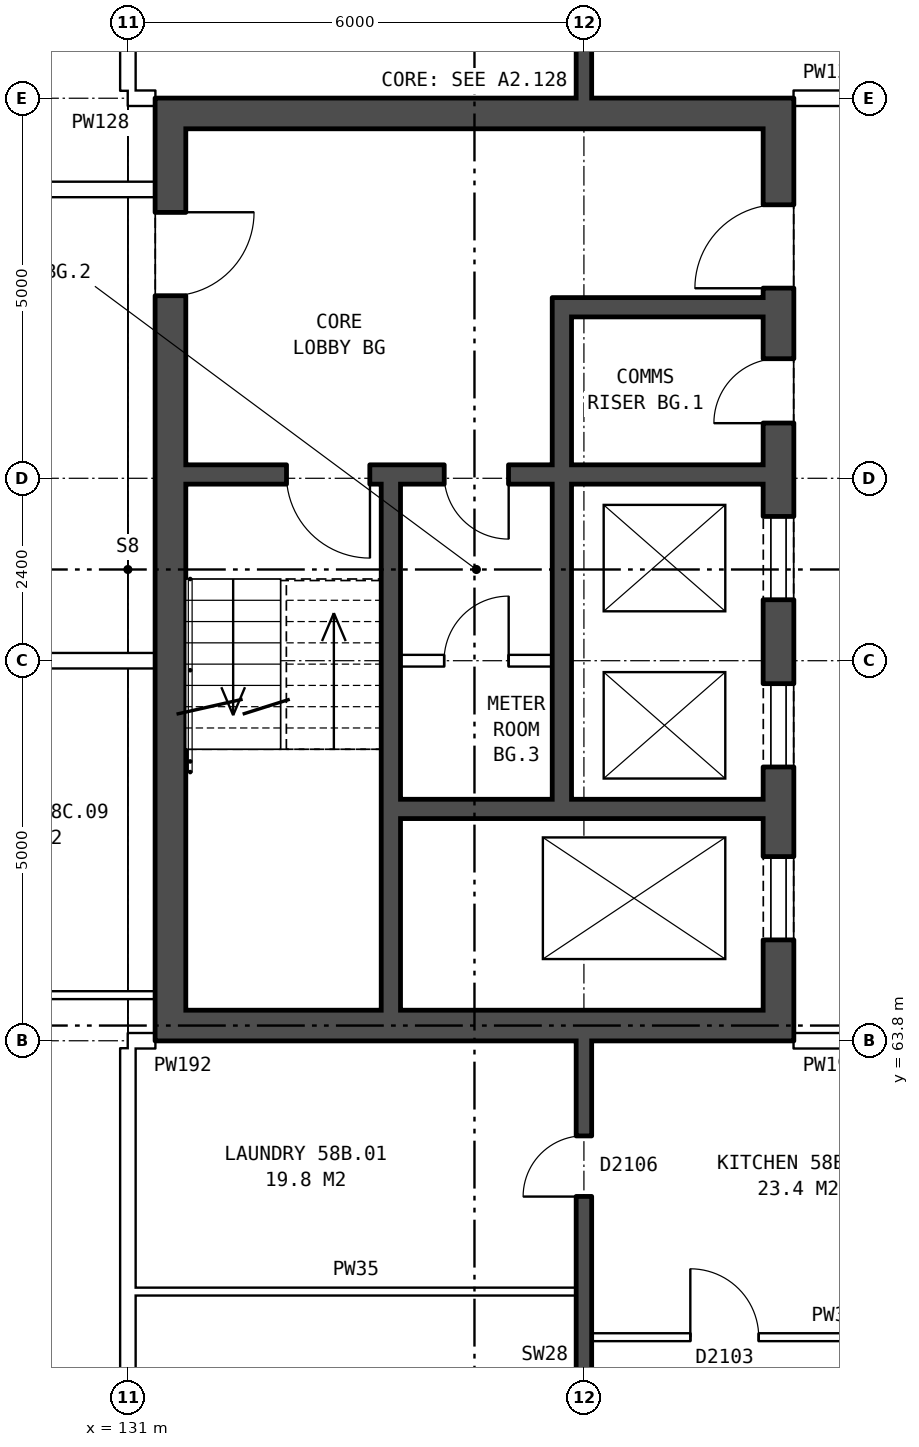
"""IFC4 building model, lengths in metres.
Left out: names, types, materials, properties, quantities, classifications, styles, units other than length and angle.
Written with IfcOpenShell. Run it as: python <this file> out.ifc"""

import sys

from ifc_helpers import new_model, si_unit, direction, frame, frame_2d, origin, place, context, subcontext, project, spatial, rectangle, extrude, element, fill, save


model = new_model("IFC4")
c1 = context("Model", 3, precision=1e-05, world=origin(), true_north=direction((0.0, 1.0)))
c2 = subcontext(c1, "Body", "Model", "MODEL_VIEW")
j1 = project(units=[si_unit("LENGTHUNIT", "METRE"), si_unit("PLANEANGLEUNIT", "RADIAN")], contexts=[c1])
p1 = place(None, origin())
s1 = spatial("IfcSite", under=j1, at=p1, CompositionType="ELEMENT")
p2 = place(p1, origin())
s2 = spatial("IfcBuilding", under=s1, at=p2, CompositionType="ELEMENT")
p3 = place(p2, frame((0.0, 0.0, 205.9)))
s3 = spatial("IfcBuildingStorey", under=s2, at=p3, CompositionType="ELEMENT", Elevation=205.9)
p4 = place(p3, frame((139.56, 63.8, 0.0), z_axis=(0.0, 0.0, 1.0), x_axis=(0.0, 1.0, 0.0)))
e1 = element("IfcWall", 1, at=p4, inside=s3, PredefinedType="SHEAR", context=c2, shape_type="SweptSolid", body=[
    extrude(rectangle(XDim=12.4, YDim=0.4, at=frame_2d((6.2, 0.0))), origin(), (0.0, 0.0, 1.0), 2.85),
])
p5 = place(p4, frame((1.325, 0.0, 0.0)))
e2 = element("IfcOpeningElement", 2, at=p5, cuts=e1, PredefinedType="OPENING", context=c2, shape_type="SweptSolid", body=[
    extrude(rectangle(XDim=1.1, YDim=2.1, at=frame_2d((0.55, 1.05))), frame((0.0, 0.21, 0.0), z_axis=(0.0, -1.0, 0.0), x_axis=(1.0, 0.0, 0.0)), (0.0, 0.0, 1.0), 0.42),
])
p6 = place(p4, frame((3.6, 0.0, 0.0)))
e3 = element("IfcOpeningElement", 3, at=p6, cuts=e1, PredefinedType="OPENING", context=c2, shape_type="SweptSolid", body=[
    extrude(rectangle(XDim=1.1, YDim=2.1, at=frame_2d((0.55, 1.05))), frame((0.0, 0.21, 0.0), z_axis=(0.0, -1.0, 0.0), x_axis=(1.0, 0.0, 0.0)), (0.0, 0.0, 1.0), 0.42),
])
p7 = place(p4, frame((5.8, 0.0, 0.0)))
e4 = element("IfcOpeningElement", 4, at=p7, cuts=e1, PredefinedType="OPENING", context=c2, shape_type="SweptSolid", body=[
    extrude(rectangle(XDim=1.1, YDim=2.1, at=frame_2d((0.55, 1.05))), frame((0.0, 0.21, 0.0), z_axis=(0.0, -1.0, 0.0), x_axis=(1.0, 0.0, 0.0)), (0.0, 0.0, 1.0), 0.42),
])
p8 = place(p4, frame((9.9, 0.0, 0.0)))
e5 = element("IfcOpeningElement", 5, at=p8, cuts=e1, PredefinedType="OPENING", context=c2, shape_type="SweptSolid", body=[
    extrude(rectangle(XDim=1.1, YDim=2.1, at=frame_2d((0.55, 1.05))), frame((0.0, 0.21, 0.0), z_axis=(0.0, -1.0, 0.0), x_axis=(1.0, 0.0, 0.0)), (0.0, 0.0, 1.0), 0.42),
])
p9 = place(p4, frame((8.125, 0.0, 0.0)))
e6 = element("IfcOpeningElement", 6, at=p9, cuts=e1, PredefinedType="OPENING", context=c2, shape_type="SweptSolid", body=[
    extrude(rectangle(XDim=0.85, YDim=2.1, at=frame_2d((0.425, 1.05))), frame((0.0, 0.21, 0.0), z_axis=(0.0, -1.0, 0.0), x_axis=(1.0, 0.0, 0.0)), (0.0, 0.0, 1.0), 0.42),
])
p10 = place(p3, frame((131.56, 63.8, 0.0), z_axis=(0.0, 0.0, 1.0), x_axis=(0.0, 1.0, 0.0)))
e7 = element("IfcWall", 7, at=p10, inside=s3, PredefinedType="SHEAR", context=c2, shape_type="SweptSolid", body=[
    extrude(rectangle(XDim=12.4, YDim=0.4, at=frame_2d((6.2, 0.0))), origin(), (0.0, 0.0, 1.0), 2.85),
])
p11 = place(p10, frame((9.8, 0.0, 0.0)))
e8 = element("IfcOpeningElement", 8, at=p11, cuts=e7, PredefinedType="OPENING", context=c2, shape_type="SweptSolid", body=[
    extrude(rectangle(XDim=1.1, YDim=2.1, at=frame_2d((0.55, 1.05))), frame((0.0, 0.21, 0.0), z_axis=(0.0, -1.0, 0.0), x_axis=(1.0, 0.0, 0.0)), (0.0, 0.0, 1.0), 0.42),
])
for number, where, z_axis, x_axis in (
    (9, (139.36, 64.0, 0.0), (0.0, 0.0, 1.0), (-1.0, 0.0, 0.0)),
    (10, (139.36, 76.0, 0.0), (0.0, 0.0, 1.0), (-1.0, 0.0, 0.0)),
):
    element("IfcWall", number, at=place(p3, frame(where, z_axis=z_axis, x_axis=x_axis)), inside=s3, PredefinedType="SHEAR", context=c2, shape_type="SweptSolid", body=[
        extrude(rectangle(XDim=7.6, YDim=0.4, at=frame_2d((3.8, 0.0))), origin(), (0.0, 0.0, 1.0), 2.85),
    ])
p12 = place(p3, frame((139.36, 66.85, 0.0), z_axis=(0.0, 0.0, 1.0), x_axis=(-1.0, 0.0, 0.0)))
e11 = element("IfcWall", 11, at=p12, inside=s3, PredefinedType="SHEAR", context=c2, shape_type="SweptSolid", body=[
    extrude(rectangle(XDim=4.775, YDim=0.25, at=frame_2d((2.388, 0.0))), origin(), (0.0, 0.0, 1.0), 2.85),
])
p13 = place(p3, frame((136.585, 68.8, 0.0), z_axis=(0.0, 0.0, 1.0), x_axis=(-1.0, 0.0, 0.0)))
e12 = element("IfcWall", 12, at=p13, inside=s3, PredefinedType="PARTITIONING", context=c2, shape_type="SweptSolid", body=[
    extrude(rectangle(XDim=2.0, YDim=0.15, at=frame_2d((1.0, 0.0))), origin(), (0.0, 0.0, 1.0), 2.85),
])
p14 = place(p13, frame((0.575, 0.0, 0.0)))
e13 = element("IfcOpeningElement", 13, at=p14, cuts=e12, PredefinedType="OPENING", context=c2, shape_type="SweptSolid", body=[
    extrude(rectangle(XDim=0.85, YDim=2.1, at=frame_2d((0.425, 1.05))), frame((0.0, 0.085, 0.0), z_axis=(0.0, -1.0, 0.0), x_axis=(1.0, 0.0, 0.0)), (0.0, 0.0, 1.0), 0.17),
])
p15 = place(p3, frame((139.36, 71.25, 0.0), z_axis=(0.0, 0.0, 1.0), x_axis=(-1.0, 0.0, 0.0)))
e14 = element("IfcWall", 14, at=p15, inside=s3, PredefinedType="SHEAR", context=c2, shape_type="SweptSolid", body=[
    extrude(rectangle(XDim=7.6, YDim=0.25, at=frame_2d((3.8, 0.0))), origin(), (0.0, 0.0, 1.0), 2.85),
])
p16 = place(p15, frame((5.175, 0.0, 0.0)))
e15 = element("IfcOpeningElement", 15, at=p16, cuts=e14, PredefinedType="OPENING", context=c2, shape_type="SweptSolid", body=[
    extrude(rectangle(XDim=1.1, YDim=2.1, at=frame_2d((0.55, 1.05))), frame((0.0, 0.135, 0.0), z_axis=(0.0, -1.0, 0.0), x_axis=(1.0, 0.0, 0.0)), (0.0, 0.0, 1.0), 0.27),
])
p17 = place(p15, frame((3.35, 0.0, 0.0)))
e16 = element("IfcOpeningElement", 16, at=p17, cuts=e14, PredefinedType="OPENING", context=c2, shape_type="SweptSolid", body=[
    extrude(rectangle(XDim=0.85, YDim=2.1, at=frame_2d((0.425, 1.05))), frame((0.0, 0.135, 0.0), z_axis=(0.0, -1.0, 0.0), x_axis=(1.0, 0.0, 0.0)), (0.0, 0.0, 1.0), 0.27),
])
p18 = place(p3, frame((139.36, 73.45, 0.0), z_axis=(0.0, 0.0, 1.0), x_axis=(-1.0, 0.0, 0.0)))
e17 = element("IfcWall", 17, at=p18, inside=s3, PredefinedType="SHEAR", context=c2, shape_type="SweptSolid", body=[
    extrude(rectangle(XDim=2.525, YDim=0.25, at=frame_2d((1.263, 0.0))), origin(), (0.0, 0.0, 1.0), 2.85),
])
p19 = place(p3, frame((136.71, 66.975, 0.0), z_axis=(0.0, 0.0, 1.0), x_axis=(0.0, 1.0, 0.0)))
e18 = element("IfcWall", 18, at=p19, inside=s3, PredefinedType="SHEAR", context=c2, shape_type="SweptSolid", body=[
    extrude(rectangle(XDim=4.15, YDim=0.25, at=frame_2d((2.075, 0.0))), origin(), (0.0, 0.0, 1.0), 2.85),
])
p20 = place(p3, frame((136.71, 71.375, 0.0), z_axis=(0.0, 0.0, 1.0), x_axis=(0.0, 1.0, 0.0)))
e19 = element("IfcWall", 19, at=p20, inside=s3, PredefinedType="SHEAR", context=c2, shape_type="SweptSolid", body=[
    extrude(rectangle(XDim=2.2, YDim=0.25, at=frame_2d((1.1, 0.0))), origin(), (0.0, 0.0, 1.0), 2.85),
])
p21 = place(p3, frame((134.46, 64.2, 0.0), z_axis=(0.0, 0.0, 1.0), x_axis=(0.0, 1.0, 0.0)))
e20 = element("IfcWall", 20, at=p21, inside=s3, PredefinedType="SHEAR", context=c2, shape_type="SweptSolid", body=[
    extrude(rectangle(XDim=6.925, YDim=0.25, at=frame_2d((3.462, 0.0))), origin(), (0.0, 0.0, 1.0), 2.85),
])
p22 = place(p3, frame((137.1, 59.9, 0.0), z_axis=(0.0, 0.0, 1.0), x_axis=(1.0, 0.0, 0.0)))
e21 = element("IfcWall", 21, at=p22, inside=s3, PredefinedType="PARTITIONING", context=c2, shape_type="SweptSolid", body=[
    extrude(rectangle(XDim=5.8, YDim=0.1, at=frame_2d((2.9, 0.0))), origin(), (0.0, 0.0, 1.0), 2.85),
])
p23 = place(p22, frame((1.3, 0.0, 0.0)))
e22 = element("IfcOpeningElement", 22, at=p23, cuts=e21, PredefinedType="OPENING", context=c2, shape_type="SweptSolid", body=[
    extrude(rectangle(XDim=0.9, YDim=2.1, at=frame_2d((0.45, 1.05))), frame((0.0, 0.06, 0.0), z_axis=(0.0, -1.0, 0.0), x_axis=(1.0, 0.0, 0.0)), (0.0, 0.0, 1.0), 0.12),
])
p24 = place(p22, frame((4.2, 0.0, 0.0)))
e23 = element("IfcOpeningElement", 23, at=p24, cuts=e21, PredefinedType="OPENING", context=c2, shape_type="SweptSolid", body=[
    extrude(rectangle(XDim=0.9, YDim=2.1, at=frame_2d((0.45, 1.05))), frame((0.0, 0.06, 0.0), z_axis=(0.0, -1.0, 0.0), x_axis=(1.0, 0.0, 0.0)), (0.0, 0.0, 1.0), 0.12),
])
p25 = place(p3, frame((131.1, 60.5, 0.0), z_axis=(0.0, 0.0, 1.0), x_axis=(1.0, 0.0, 0.0)))
e24 = element("IfcWall", 24, at=p25, inside=s3, PredefinedType="PARTITIONING", context=c2, shape_type="SweptSolid", body=[
    extrude(rectangle(XDim=5.8, YDim=0.1, at=frame_2d((2.9, 0.0))), origin(), (0.0, 0.0, 1.0), 2.85),
])
p26 = place(p3, frame((131.0, 63.8, 0.0), z_axis=(0.0, 0.0, 1.0), x_axis=(1.0, 0.0, 0.0)))
e25 = element("IfcWall", 25, at=p26, inside=s3, PredefinedType="PARTITIONING", context=c2, shape_type="SweptSolid", body=[
    extrude(rectangle(XDim=0.36, YDim=0.2, at=frame_2d((0.18, 0.0))), origin(), (0.0, 0.0, 1.0), 2.85),
])
p27 = place(p3, frame((139.76, 63.8, 0.0), z_axis=(0.0, 0.0, 1.0), x_axis=(1.0, 0.0, 0.0)))
e26 = element("IfcWall", 26, at=p27, inside=s3, PredefinedType="PARTITIONING", context=c2, shape_type="SweptSolid", body=[
    extrude(rectangle(XDim=3.0, YDim=0.2, at=frame_2d((1.5, 0.0))), origin(), (0.0, 0.0, 1.0), 2.85),
])
p28 = place(p27, frame((1.0, 0.0, 0.0)))
e27 = element("IfcOpeningElement", 27, at=p28, cuts=e26, PredefinedType="OPENING", context=c2, shape_type="SweptSolid", body=[
    extrude(rectangle(XDim=1.0, YDim=2.1, at=frame_2d((0.5, 1.05))), frame((0.0, 0.11, 0.0), z_axis=(0.0, -1.0, 0.0), x_axis=(1.0, 0.0, 0.0)), (0.0, 0.0, 1.0), 0.22),
])
p29 = place(p3, frame((127.912, 64.4, 0.0), z_axis=(0.0, 0.0, 1.0), x_axis=(1.0, 0.0, 0.0)))
e28 = element("IfcWall", 28, at=p29, inside=s3, PredefinedType="PARTITIONING", context=c2, shape_type="SweptSolid", body=[
    extrude(rectangle(XDim=3.448, YDim=0.1, at=frame_2d((1.724, 0.0))), origin(), (0.0, 0.0, 1.0), 2.85),
])
p30 = place(p3, frame((75.64, 68.8, 0.0), z_axis=(0.0, 0.0, 1.0), x_axis=(1.0, 0.0, 0.0)))
e29 = element("IfcWall", 29, at=p30, inside=s3, PredefinedType="PARTITIONING", context=c2, shape_type="SweptSolid", body=[
    extrude(rectangle(XDim=55.72, YDim=0.2, at=frame_2d((27.86, 0.0))), origin(), (0.0, 0.0, 1.0), 2.85),
])
p31 = place(p30, frame((5.191, 0.0, 0.0)))
e30 = element("IfcOpeningElement", 30, at=p31, cuts=e29, PredefinedType="OPENING", context=c2, shape_type="SweptSolid", body=[
    extrude(rectangle(XDim=1.0, YDim=2.1, at=frame_2d((0.5, 1.05))), frame((0.0, 0.11, 0.0), z_axis=(0.0, -1.0, 0.0), x_axis=(1.0, 0.0, 0.0)), (0.0, 0.0, 1.0), 0.22),
])
p32 = place(p30, frame((12.241, 0.0, 0.0)))
e31 = element("IfcOpeningElement", 31, at=p32, cuts=e29, PredefinedType="OPENING", context=c2, shape_type="SweptSolid", body=[
    extrude(rectangle(XDim=1.0, YDim=2.1, at=frame_2d((0.5, 1.05))), frame((0.0, 0.11, 0.0), z_axis=(0.0, -1.0, 0.0), x_axis=(1.0, 0.0, 0.0)), (0.0, 0.0, 1.0), 0.22),
])
p33 = place(p30, frame((22.553, 0.0, 0.0)))
e32 = element("IfcOpeningElement", 32, at=p33, cuts=e29, PredefinedType="OPENING", context=c2, shape_type="SweptSolid", body=[
    extrude(rectangle(XDim=1.0, YDim=2.1, at=frame_2d((0.5, 1.05))), frame((0.0, 0.11, 0.0), z_axis=(0.0, -1.0, 0.0), x_axis=(1.0, 0.0, 0.0)), (0.0, 0.0, 1.0), 0.22),
])
p34 = place(p30, frame((32.866, 0.0, 0.0)))
e33 = element("IfcOpeningElement", 33, at=p34, cuts=e29, PredefinedType="OPENING", context=c2, shape_type="SweptSolid", body=[
    extrude(rectangle(XDim=1.0, YDim=2.1, at=frame_2d((0.5, 1.05))), frame((0.0, 0.11, 0.0), z_axis=(0.0, -1.0, 0.0), x_axis=(1.0, 0.0, 0.0)), (0.0, 0.0, 1.0), 0.22),
])
p35 = place(p30, frame((36.303, 0.0, 0.0)))
e34 = element("IfcOpeningElement", 34, at=p35, cuts=e29, PredefinedType="OPENING", context=c2, shape_type="SweptSolid", body=[
    extrude(rectangle(XDim=1.0, YDim=2.1, at=frame_2d((0.5, 1.05))), frame((0.0, 0.11, 0.0), z_axis=(0.0, -1.0, 0.0), x_axis=(1.0, 0.0, 0.0)), (0.0, 0.0, 1.0), 0.22),
])
p36 = place(p30, frame((43.178, 0.0, 0.0)))
e35 = element("IfcOpeningElement", 35, at=p36, cuts=e29, PredefinedType="OPENING", context=c2, shape_type="SweptSolid", body=[
    extrude(rectangle(XDim=1.0, YDim=2.1, at=frame_2d((0.5, 1.05))), frame((0.0, 0.11, 0.0), z_axis=(0.0, -1.0, 0.0), x_axis=(1.0, 0.0, 0.0)), (0.0, 0.0, 1.0), 0.22),
])
p37 = place(p30, frame((50.053, 0.0, 0.0)))
e36 = element("IfcOpeningElement", 36, at=p37, cuts=e29, PredefinedType="OPENING", context=c2, shape_type="SweptSolid", body=[
    extrude(rectangle(XDim=1.0, YDim=2.1, at=frame_2d((0.5, 1.05))), frame((0.0, 0.11, 0.0), z_axis=(0.0, -1.0, 0.0), x_axis=(1.0, 0.0, 0.0)), (0.0, 0.0, 1.0), 0.22),
])
p38 = place(p3, frame((124.475, 75.0, 0.0), z_axis=(0.0, 0.0, 1.0), x_axis=(1.0, 0.0, 0.0)))
e37 = element("IfcWall", 37, at=p38, inside=s3, PredefinedType="PARTITIONING", context=c2, shape_type="SweptSolid", body=[
    extrude(rectangle(XDim=6.885, YDim=0.2, at=frame_2d((3.442, 0.0))), origin(), (0.0, 0.0, 1.0), 2.85),
])
p39 = place(p38, frame((2.992, 0.0, 0.0)))
e38 = element("IfcOpeningElement", 38, at=p39, cuts=e37, PredefinedType="OPENING", context=c2, shape_type="SweptSolid", body=[
    extrude(rectangle(XDim=0.9, YDim=2.1, at=frame_2d((0.45, 1.05))), frame((0.0, 0.11, 0.0), z_axis=(0.0, -1.0, 0.0), x_axis=(1.0, 0.0, 0.0)), (0.0, 0.0, 1.0), 0.22),
])
p40 = place(p3, frame((131.0, 76.2, 0.0), z_axis=(0.0, 0.0, 1.0), x_axis=(1.0, 0.0, 0.0)))
e39 = element("IfcWall", 39, at=p40, inside=s3, PredefinedType="PARTITIONING", context=c2, shape_type="SweptSolid", body=[
    extrude(rectangle(XDim=0.36, YDim=0.2, at=frame_2d((0.18, 0.0))), origin(), (0.0, 0.0, 1.0), 2.85),
])
p41 = place(p3, frame((139.76, 76.2, 0.0), z_axis=(0.0, 0.0, 1.0), x_axis=(1.0, 0.0, 0.0)))
e40 = element("IfcWall", 40, at=p41, inside=s3, PredefinedType="PARTITIONING", context=c2, shape_type="SweptSolid", body=[
    extrude(rectangle(XDim=3.0, YDim=0.2, at=frame_2d((1.5, 0.0))), origin(), (0.0, 0.0, 1.0), 2.85),
])
p42 = place(p41, frame((1.0, 0.0, 0.0)))
e41 = element("IfcOpeningElement", 41, at=p42, cuts=e40, PredefinedType="OPENING", context=c2, shape_type="SweptSolid", body=[
    extrude(rectangle(XDim=1.0, YDim=2.1, at=frame_2d((0.5, 1.05))), frame((0.0, 0.11, 0.0), z_axis=(0.0, -1.0, 0.0), x_axis=(1.0, 0.0, 0.0)), (0.0, 0.0, 1.0), 0.22),
])
for number, where, z_axis, x_axis in (
    (42, (131.0, 54.36, 0.0), (0.0, 0.0, 1.0), (0.0, 1.0, 0.0)),
    (43, (131.0, 76.3, 0.0), (0.0, 0.0, 1.0), (0.0, 1.0, 0.0)),
):
    element("IfcWall", number, at=place(p3, frame(where, z_axis=z_axis, x_axis=x_axis)), inside=s3, PredefinedType="PARTITIONING", context=c2, shape_type="SweptSolid", body=[
        extrude(rectangle(XDim=9.34, YDim=0.2, at=frame_2d((4.67, 0.0))), origin(), (0.0, 0.0, 1.0), 2.85),
    ])
p43 = place(p3, frame((137.0, 54.36, 0.0), z_axis=(0.0, 0.0, 1.0), x_axis=(0.0, 1.0, 0.0)))
e44 = element("IfcWall", 44, at=p43, inside=s3, PredefinedType="SOLIDWALL", context=c2, shape_type="SweptSolid", body=[
    extrude(rectangle(XDim=9.44, YDim=0.2, at=frame_2d((4.72, 0.0))), origin(), (0.0, 0.0, 1.0), 2.85),
])
p44 = place(p43, frame((2.32, 0.0, 0.0)))
e45 = element("IfcOpeningElement", 45, at=p44, cuts=e44, PredefinedType="OPENING", context=c2, shape_type="SweptSolid", body=[
    extrude(rectangle(XDim=0.9, YDim=2.1, at=frame_2d((0.45, 1.05))), frame((0.0, 0.11, 0.0), z_axis=(0.0, -1.0, 0.0), x_axis=(1.0, 0.0, 0.0)), (0.0, 0.0, 1.0), 0.22),
])
p45 = place(p43, frame((7.39, 0.0, 0.0)))
e46 = element("IfcOpeningElement", 46, at=p45, cuts=e44, PredefinedType="OPENING", context=c2, shape_type="SweptSolid", body=[
    extrude(rectangle(XDim=0.8, YDim=2.1, at=frame_2d((0.4, 1.05))), frame((0.0, 0.11, 0.0), z_axis=(0.0, -1.0, 0.0), x_axis=(1.0, 0.0, 0.0)), (0.0, 0.0, 1.0), 0.22),
])
p46 = place(p3, frame((137.0, 76.2, 0.0), z_axis=(0.0, 0.0, 1.0), x_axis=(0.0, 1.0, 0.0)))
e47 = element("IfcWall", 47, at=p46, inside=s3, PredefinedType="SOLIDWALL", context=c2, shape_type="SweptSolid", body=[
    extrude(rectangle(XDim=9.44, YDim=0.2, at=frame_2d((4.72, 0.0))), origin(), (0.0, 0.0, 1.0), 2.85),
])
p47 = place(p46, frame((6.07, 0.0, 0.0)))
e48 = element("IfcOpeningElement", 48, at=p47, cuts=e47, PredefinedType="OPENING", context=c2, shape_type="SweptSolid", body=[
    extrude(rectangle(XDim=0.9, YDim=2.1, at=frame_2d((0.45, 1.05))), frame((0.0, 0.11, 0.0), z_axis=(0.0, -1.0, 0.0), x_axis=(1.0, 0.0, 0.0)), (0.0, 0.0, 1.0), 0.22),
])
p48 = place(p46, frame((1.25, 0.0, 0.0)))
e49 = element("IfcOpeningElement", 49, at=p48, cuts=e47, PredefinedType="OPENING", context=c2, shape_type="SweptSolid", body=[
    extrude(rectangle(XDim=0.8, YDim=2.1, at=frame_2d((0.4, 1.05))), frame((0.0, 0.11, 0.0), z_axis=(0.0, -1.0, 0.0), x_axis=(1.0, 0.0, 0.0)), (0.0, 0.0, 1.0), 0.22),
])
p49 = place(p5, origin())
e50 = element("IfcDoor", 50, at=p49, inside=s3, OperationType="DOUBLE_DOOR_SLIDING", PredefinedType="DOOR", context=c2, shape_type="SweptSolid", body=[
    extrude(rectangle(XDim=1.1, YDim=2.1, at=frame_2d((0.55, 1.05))), frame((0.0, 0.185, 0.0), z_axis=(0.0, -1.0, 0.0), x_axis=(1.0, 0.0, 0.0)), (0.0, 0.0, 1.0), 0.05),
])
fill(e2, e50)
p50 = place(p6, origin())
e51 = element("IfcDoor", 51, at=p50, inside=s3, OperationType="DOUBLE_DOOR_SLIDING", PredefinedType="DOOR", context=c2, shape_type="SweptSolid", body=[
    extrude(rectangle(XDim=1.1, YDim=2.1, at=frame_2d((0.55, 1.05))), frame((0.0, 0.185, 0.0), z_axis=(0.0, -1.0, 0.0), x_axis=(1.0, 0.0, 0.0)), (0.0, 0.0, 1.0), 0.05),
])
fill(e3, e51)
p51 = place(p7, origin())
e52 = element("IfcDoor", 52, at=p51, inside=s3, OperationType="DOUBLE_DOOR_SLIDING", PredefinedType="DOOR", context=c2, shape_type="SweptSolid", body=[
    extrude(rectangle(XDim=1.1, YDim=2.1, at=frame_2d((0.55, 1.05))), frame((0.0, 0.185, 0.0), z_axis=(0.0, -1.0, 0.0), x_axis=(1.0, 0.0, 0.0)), (0.0, 0.0, 1.0), 0.05),
])
fill(e4, e52)
p52 = place(p8, origin())
e53 = element("IfcDoor", 53, at=p52, inside=s3, OperationType="SINGLE_SWING_LEFT", PredefinedType="DOOR", context=c2, shape_type="SweptSolid", body=[
    extrude(rectangle(XDim=1.1, YDim=2.1, at=frame_2d((0.55, 1.05))), frame((0.0, 0.185, 0.0), z_axis=(0.0, -1.0, 0.0), x_axis=(1.0, 0.0, 0.0)), (0.0, 0.0, 1.0), 0.05),
])
fill(e5, e53)
p53 = place(p16, origin())
e54 = element("IfcDoor", 54, at=p53, inside=s3, OperationType="SINGLE_SWING_LEFT", PredefinedType="DOOR", context=c2, shape_type="SweptSolid", body=[
    extrude(rectangle(XDim=1.1, YDim=2.1, at=frame_2d((0.55, 1.05))), frame((0.0, 0.025, 0.0), z_axis=(0.0, -1.0, 0.0), x_axis=(1.0, 0.0, 0.0)), (0.0, 0.0, 1.0), 0.05),
])
fill(e15, e54)
p54 = place(p9, origin())
e55 = element("IfcDoor", 55, at=p54, inside=s3, OperationType="SINGLE_SWING_LEFT", PredefinedType="DOOR", context=c2, shape_type="SweptSolid", body=[
    extrude(rectangle(XDim=0.85, YDim=2.1, at=frame_2d((0.425, 1.05))), frame((0.0, 0.185, 0.0), z_axis=(0.0, -1.0, 0.0), x_axis=(1.0, 0.0, 0.0)), (0.0, 0.0, 1.0), 0.05),
])
fill(e6, e55)
p55 = place(p17, origin())
e56 = element("IfcDoor", 56, at=p55, inside=s3, OperationType="SINGLE_SWING_LEFT", PredefinedType="DOOR", context=c2, shape_type="SweptSolid", body=[
    extrude(rectangle(XDim=0.85, YDim=2.1, at=frame_2d((0.425, 1.05))), frame((0.0, 0.025, 0.0), z_axis=(0.0, -1.0, 0.0), x_axis=(1.0, 0.0, 0.0)), (0.0, 0.0, 1.0), 0.05),
])
fill(e16, e56)
p56 = place(p14, frame((0.85, 0.0, 0.0), z_axis=(0.0, 0.0, 1.0), x_axis=(-1.0, 0.0, 0.0)))
e57 = element("IfcDoor", 57, at=p56, inside=s3, OperationType="SINGLE_SWING_RIGHT", PredefinedType="DOOR", context=c2, shape_type="SweptSolid", body=[
    extrude(rectangle(XDim=0.85, YDim=2.1, at=frame_2d((0.425, 1.05))), frame((0.0, 0.025, 0.0), z_axis=(0.0, -1.0, 0.0), x_axis=(1.0, 0.0, 0.0)), (0.0, 0.0, 1.0), 0.05),
])
fill(e13, e57)
p57 = place(p11, frame((1.1, 0.0, 0.0), z_axis=(0.0, 0.0, 1.0), x_axis=(-1.0, 0.0, 0.0)))
e58 = element("IfcDoor", 58, at=p57, inside=s3, OperationType="SINGLE_SWING_LEFT", PredefinedType="DOOR", context=c2, shape_type="SweptSolid", body=[
    extrude(rectangle(XDim=1.1, YDim=2.1, at=frame_2d((0.55, 1.05))), frame((0.0, 0.185, 0.0), z_axis=(0.0, -1.0, 0.0), x_axis=(1.0, 0.0, 0.0)), (0.0, 0.0, 1.0), 0.05),
])
fill(e8, e58)
p58 = place(p23, origin())
e59 = element("IfcDoor", 59, at=p58, inside=s3, OperationType="SINGLE_SWING_LEFT", PredefinedType="DOOR", context=c2, shape_type="SweptSolid", body=[
    extrude(rectangle(XDim=0.9, YDim=2.1, at=frame_2d((0.45, 1.05))), frame((0.0, 0.025, 0.0), z_axis=(0.0, -1.0, 0.0), x_axis=(1.0, 0.0, 0.0)), (0.0, 0.0, 1.0), 0.05),
])
fill(e22, e59)
p59 = place(p45, origin())
e60 = element("IfcDoor", 60, at=p59, inside=s3, OperationType="SINGLE_SWING_LEFT", PredefinedType="DOOR", context=c2, shape_type="SweptSolid", body=[
    extrude(rectangle(XDim=0.8, YDim=2.1, at=frame_2d((0.4, 1.05))), frame((0.0, 0.025, 0.0), z_axis=(0.0, -1.0, 0.0), x_axis=(1.0, 0.0, 0.0)), (0.0, 0.0, 1.0), 0.05),
])
fill(e46, e60)
save(model, sys.argv[1])
